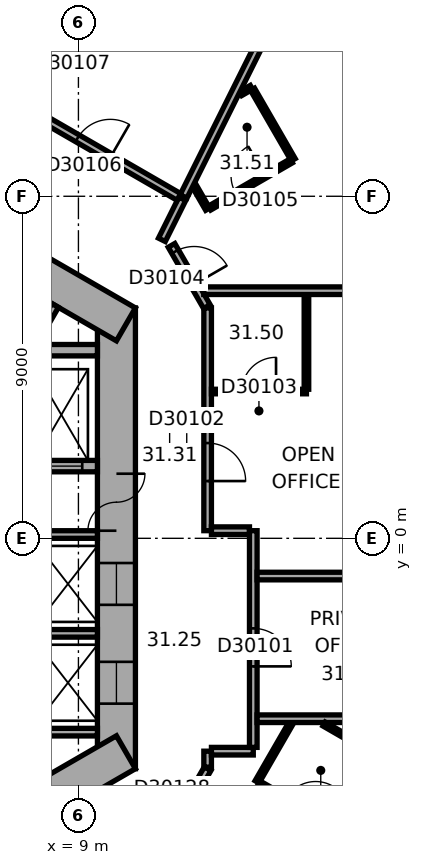
"""IFC4 building model, lengths in metres.
Left out: names, types, materials, properties, quantities, classifications, styles, units other than length and angle.
Written with IfcOpenShell. Run it as: python <this file> out.ifc"""

import sys

from ifc_helpers import new_model, si_unit, direction, frame, frame_2d, origin, place, context, subcontext, project, spatial, rectangle, extrude, element, fill, save


model = new_model("IFC4")
c1 = context("Model", 3, precision=1e-05, world=origin(), true_north=direction((0.0, 1.0)))
c2 = subcontext(c1, "Body", "Model", "MODEL_VIEW")
j1 = project(units=[si_unit("LENGTHUNIT", "METRE"), si_unit("PLANEANGLEUNIT", "RADIAN")], contexts=[c1])
p1 = place(None, origin())
s1 = spatial("IfcSite", under=j1, at=p1, CompositionType="ELEMENT")
p2 = place(p1, origin())
s2 = spatial("IfcBuilding", under=s1, at=p2, CompositionType="ELEMENT")
p3 = place(p2, frame((0.0, 0.0, 128.1)))
s3 = spatial("IfcBuildingStorey", under=s2, at=p3, CompositionType="ELEMENT", Elevation=128.1)
p4 = place(p3, frame((10.0, -6.062, 0.0), z_axis=(0.0, 0.0, 1.0), x_axis=(0.0, 1.0, 0.0)))
e1 = element("IfcWall", 1, at=p4, inside=s3, PredefinedType="SHEAR", context=c2, shape_type="SweptSolid", body=[
    extrude(rectangle(XDim=12.125, YDim=1.0, at=frame_2d((6.062, 0.0))), origin(), (0.0, 0.0, 1.0), 3.7),
])
p5 = place(p4, frame((6.262, 0.0, 0.0)))
e2 = element("IfcOpeningElement", 2, at=p5, cuts=e1, PredefinedType="OPENING", context=c2, shape_type="SweptSolid", body=[
    extrude(rectangle(XDim=1.5, YDim=2.1, at=frame_2d((0.75, 1.05))), frame((0.0, 0.51, 0.0), z_axis=(0.0, -1.0, 0.0), x_axis=(1.0, 0.0, 0.0)), (0.0, 0.0, 1.0), 1.02),
])
p6 = place(p4, frame((1.712, 0.0, 0.0)))
e3 = element("IfcOpeningElement", 3, at=p6, cuts=e1, PredefinedType="OPENING", context=c2, shape_type="SweptSolid", body=[
    extrude(rectangle(XDim=1.1, YDim=2.1, at=frame_2d((0.55, 1.05))), frame((0.0, 0.51, 0.0), z_axis=(0.0, -1.0, 0.0), x_axis=(1.0, 0.0, 0.0)), (0.0, 0.0, 1.0), 1.02),
])
p7 = place(p4, frame((4.312, 0.0, 0.0)))
e4 = element("IfcOpeningElement", 4, at=p7, cuts=e1, PredefinedType="OPENING", context=c2, shape_type="SweptSolid", body=[
    extrude(rectangle(XDim=1.1, YDim=2.1, at=frame_2d((0.55, 1.05))), frame((0.0, 0.51, 0.0), z_axis=(0.0, -1.0, 0.0), x_axis=(1.0, 0.0, 0.0)), (0.0, 0.0, 1.0), 1.02),
])
p8 = place(p3, frame((10.25, 5.629, 0.0), z_axis=(0.0, 0.0, 1.0), x_axis=(-0.866022616891, 0.50000482701, 0.0)))
e5 = element("IfcWall", 5, at=p8, inside=s3, PredefinedType="SHEAR", context=c2, shape_type="SweptSolid", body=[
    extrude(rectangle(XDim=12.125, YDim=1.0, at=frame_2d((6.062, 0.0))), origin(), (0.0, 0.0, 1.0), 3.7),
])
p9 = place(p8, frame((2.612, 0.0, 0.0)))
e6 = element("IfcOpeningElement", 6, at=p9, cuts=e5, PredefinedType="OPENING", context=c2, shape_type="SweptSolid", body=[
    extrude(rectangle(XDim=1.1, YDim=2.1, at=frame_2d((0.55, 1.05))), frame((0.0, 0.51, 0.0), z_axis=(0.0, -1.0, 0.0), x_axis=(1.0, 0.0, 0.0)), (0.0, 0.0, 1.0), 1.02),
])
p10 = place(p8, frame((5.212, 0.0, 0.0)))
e7 = element("IfcOpeningElement", 7, at=p10, cuts=e5, PredefinedType="OPENING", context=c2, shape_type="SweptSolid", body=[
    extrude(rectangle(XDim=1.1, YDim=2.1, at=frame_2d((0.55, 1.05))), frame((0.0, 0.51, 0.0), z_axis=(0.0, -1.0, 0.0), x_axis=(1.0, 0.0, 0.0)), (0.0, 0.0, 1.0), 1.02),
])
p11 = place(p8, frame((7.812, 0.0, 0.0)))
e8 = element("IfcOpeningElement", 8, at=p11, cuts=e5, PredefinedType="OPENING", context=c2, shape_type="SweptSolid", body=[
    extrude(rectangle(XDim=1.1, YDim=2.1, at=frame_2d((0.55, 1.05))), frame((0.0, 0.51, 0.0), z_axis=(0.0, -1.0, 0.0), x_axis=(1.0, 0.0, 0.0)), (0.0, 0.0, 1.0), 1.02),
])
p12 = place(p3, frame((-0.25, -11.691, 0.0), z_axis=(0.0, 0.0, 1.0), x_axis=(0.866022616891, 0.50000482701, 0.0)))
e9 = element("IfcWall", 9, at=p12, inside=s3, PredefinedType="SHEAR", context=c2, shape_type="SweptSolid", body=[
    extrude(rectangle(XDim=12.125, YDim=1.0, at=frame_2d((6.062, 0.0))), origin(), (0.0, 0.0, 1.0), 3.7),
])
p13 = place(p12, frame((4.012, 0.0, 0.0)))
e10 = element("IfcOpeningElement", 10, at=p13, cuts=e9, PredefinedType="OPENING", context=c2, shape_type="SweptSolid", body=[
    extrude(rectangle(XDim=0.9, YDim=2.1, at=frame_2d((0.45, 1.05))), frame((0.0, 0.51, 0.0), z_axis=(0.0, -1.0, 0.0), x_axis=(1.0, 0.0, 0.0)), (0.0, 0.0, 1.0), 1.02),
])
p14 = place(p12, frame((7.812, 0.0, 0.0)))
e11 = element("IfcOpeningElement", 11, at=p14, cuts=e9, PredefinedType="OPENING", context=c2, shape_type="SweptSolid", body=[
    extrude(rectangle(XDim=1.1, YDim=2.1, at=frame_2d((0.55, 1.05))), frame((0.0, 0.51, 0.0), z_axis=(0.0, -1.0, 0.0), x_axis=(1.0, 0.0, 0.0)), (0.0, 0.0, 1.0), 1.02),
])
for number, where, z_axis, x_axis in (
    (12, (7.3, -5.1, 0.0), (0.0, 0.0, 1.0), (1.0, 0.0, 0.0)),
    (13, (7.3, -2.5, 0.0), (0.0, 0.0, 1.0), (1.0, 0.0, 0.0)),
    (14, (7.3, 0.1, 0.0), (0.0, 0.0, 1.0), (1.0, 0.0, 0.0)),
    (15, (7.287, 4.222, 0.0), (0.0, 0.0, 1.0), (0.5, 0.866, 0.0)),
):
    element("IfcWall", number, at=place(p3, frame(where, z_axis=z_axis, x_axis=x_axis)), inside=s3, PredefinedType="PARTITIONING", context=c2, shape_type="SweptSolid", body=[
        extrude(rectangle(XDim=2.2, YDim=0.2, at=frame_2d((1.1, 0.0))), origin(), (0.0, 0.0, 1.0), 3.42),
    ])
p15 = place(p3, frame((7.3, 1.9, 0.0), z_axis=(0.0, 0.0, 1.0), x_axis=(1.0, 0.0, 0.0)))
e16 = element("IfcWall", 16, at=p15, inside=s3, PredefinedType="SHEAR", context=c2, shape_type="SweptSolid", body=[
    extrude(rectangle(XDim=2.2, YDim=0.3, at=frame_2d((1.1, 0.0))), origin(), (0.0, 0.0, 1.0), 3.42),
])
p16 = place(p15, frame((0.7, 0.0, 0.0)))
e17 = element("IfcOpeningElement", 17, at=p16, cuts=e16, PredefinedType="OPENING", context=c2, shape_type="SweptSolid", body=[
    extrude(rectangle(XDim=1.1, YDim=2.1, at=frame_2d((0.55, 1.05))), frame((0.0, 0.16, 0.0), z_axis=(0.0, -1.0, 0.0), x_axis=(1.0, 0.0, 0.0)), (0.0, 0.0, 1.0), 0.32),
])
p17 = place(p3, frame((7.3, 4.95, 0.0), z_axis=(0.0, 0.0, 1.0), x_axis=(1.0, 0.0, 0.0)))
e18 = element("IfcWall", 18, at=p17, inside=s3, PredefinedType="SHEAR", context=c2, shape_type="SweptSolid", body=[
    extrude(rectangle(XDim=2.2, YDim=0.3, at=frame_2d((1.1, 0.0))), origin(), (0.0, 0.0, 1.0), 3.42),
])
p18 = place(p3, frame((8.37, 19.013, 0.0), z_axis=(0.0, 0.0, 1.0), x_axis=(-0.446187985757, -0.894939261272, 0.0)))
e19 = element("IfcWall", 19, at=p18, inside=s3, PredefinedType="PARTITIONING", context=c2, shape_type="SweptSolid", body=[
    extrude(rectangle(XDim=6.953, YDim=0.2, at=frame_2d((3.477, 0.0))), origin(), (0.0, 0.0, 1.0), 3.42),
])
p19 = place(p3, frame((8.394, 13.792, 0.0), z_axis=(0.0, 0.0, 1.0), x_axis=(-0.500002508028, -0.866023955769, 0.0)))
e20 = element("IfcWall", 20, at=p19, inside=s3, PredefinedType="PARTITIONING", context=c2, shape_type="SweptSolid", body=[
    extrude(rectangle(XDim=2.44, YDim=0.12, at=frame_2d((1.22, 0.0))), origin(), (0.0, 0.0, 1.0), 3.42),
])
p20 = place(p19, frame((0.77, 0.0, 0.0)))
e21 = element("IfcOpeningElement", 21, at=p20, cuts=e20, PredefinedType="OPENING", context=c2, shape_type="SweptSolid", body=[
    extrude(rectangle(XDim=0.9, YDim=2.1, at=frame_2d((0.45, 1.05))), frame((0.0, 0.07, 0.0), z_axis=(0.0, -1.0, 0.0), x_axis=(1.0, 0.0, 0.0)), (0.0, 0.0, 1.0), 0.14),
])
p21 = place(p3, frame((11.196, 7.854, 0.0), z_axis=(0.0, 0.0, 1.0), x_axis=(0.446241040303, 0.894912808015, 0.0)))
e22 = element("IfcWall", 22, at=p21, inside=s3, PredefinedType="PARTITIONING", context=c2, shape_type="SweptSolid", body=[
    extrude(rectangle(XDim=1.205, YDim=0.2, at=frame_2d((0.603, 0.0))), origin(), (0.0, 0.0, 1.0), 3.42),
])
p22 = place(p3, frame((11.47, -7.673, 0.0), z_axis=(0.0, 0.0, 1.0), x_axis=(0.499964847546, 0.866045698112, 0.0)))
e23 = element("IfcWall", 23, at=p22, inside=s3, PredefinedType="PARTITIONING", context=c2, shape_type="SweptSolid", body=[
    extrude(rectangle(XDim=1.86, YDim=0.2, at=frame_2d((0.93, 0.0))), origin(), (0.0, 0.0, 1.0), 3.42),
])
p23 = place(p22, frame((0.43, 0.0, 0.0)))
e24 = element("IfcOpeningElement", 24, at=p23, cuts=e23, PredefinedType="OPENING", context=c2, shape_type="SweptSolid", body=[
    extrude(rectangle(XDim=1.0, YDim=2.1, at=frame_2d((0.5, 1.05))), frame((0.0, 0.11, 0.0), z_axis=(0.0, -1.0, 0.0), x_axis=(1.0, 0.0, 0.0)), (0.0, 0.0, 1.0), 0.22),
])
p24 = place(p3, frame((11.646, 8.981, 0.0), z_axis=(0.0, 0.0, 1.0), x_axis=(-0.866027142779, 0.499996987961, 0.0)))
e25 = element("IfcWall", 25, at=p24, inside=s3, PredefinedType="PARTITIONING", context=c2, shape_type="SweptSolid", body=[
    extrude(rectangle(XDim=9.597, YDim=0.2, at=frame_2d((4.798, 0.0))), origin(), (0.0, 0.0, 1.0), 3.42),
])
p25 = place(p24, frame((2.086, 0.0, 0.0)))
e26 = element("IfcOpeningElement", 26, at=p25, cuts=e25, PredefinedType="OPENING", context=c2, shape_type="SweptSolid", body=[
    extrude(rectangle(XDim=1.0, YDim=2.1, at=frame_2d((0.5, 1.05))), frame((0.0, 0.11, 0.0), z_axis=(0.0, -1.0, 0.0), x_axis=(1.0, 0.0, 0.0)), (0.0, 0.0, 1.0), 0.22),
])
p26 = place(p24, frame((8.01, 0.0, 0.0)))
e27 = element("IfcOpeningElement", 27, at=p26, cuts=e25, PredefinedType="OPENING", context=c2, shape_type="SweptSolid", body=[
    extrude(rectangle(XDim=1.0, YDim=2.1, at=frame_2d((0.5, 1.05))), frame((0.0, 0.11, 0.0), z_axis=(0.0, -1.0, 0.0), x_axis=(1.0, 0.0, 0.0)), (0.0, 0.0, 1.0), 0.22),
])
p27 = place(p3, frame((12.38, 6.097, 0.0), z_axis=(0.0, 0.0, 1.0), x_axis=(-0.499964847546, 0.866045698112, 0.0)))
e28 = element("IfcWall", 28, at=p27, inside=s3, PredefinedType="PARTITIONING", context=c2, shape_type="SweptSolid", body=[
    extrude(rectangle(XDim=1.86, YDim=0.2, at=frame_2d((0.93, 0.0))), origin(), (0.0, 0.0, 1.0), 3.42),
])
p28 = place(p27, frame((0.672, 0.0, 0.0)))
e29 = element("IfcOpeningElement", 29, at=p28, cuts=e28, PredefinedType="OPENING", context=c2, shape_type="SweptSolid", body=[
    extrude(rectangle(XDim=1.0, YDim=2.1, at=frame_2d((0.5, 1.05))), frame((0.0, 0.11, 0.0), z_axis=(0.0, -1.0, 0.0), x_axis=(1.0, 0.0, 0.0)), (0.0, 0.0, 1.0), 0.22),
])
p29 = place(p3, frame((12.4, -6.022, 0.0), z_axis=(0.0, 0.0, 1.0), x_axis=(0.0, 1.0, 0.0)))
e30 = element("IfcWall", 30, at=p29, inside=s3, PredefinedType="PARTITIONING", context=c2, shape_type="SweptSolid", body=[
    extrude(rectangle(XDim=0.421, YDim=0.2, at=frame_2d((0.21, 0.0))), origin(), (0.0, 0.0, 1.0), 3.42),
])
p30 = place(p3, frame((12.4, 0.201, 0.0), z_axis=(0.0, 0.0, 1.0), x_axis=(0.0, 1.0, 0.0)))
e31 = element("IfcWall", 31, at=p30, inside=s3, PredefinedType="PARTITIONING", context=c2, shape_type="SweptSolid", body=[
    extrude(rectangle(XDim=5.861, YDim=0.2, at=frame_2d((2.931, 0.0))), origin(), (0.0, 0.0, 1.0), 3.42),
])
p31 = place(p30, frame((1.306, 0.0, 0.0)))
e32 = element("IfcOpeningElement", 32, at=p31, cuts=e31, PredefinedType="OPENING", context=c2, shape_type="SweptSolid", body=[
    extrude(rectangle(XDim=1.0, YDim=2.1, at=frame_2d((0.5, 1.05))), frame((0.0, 0.11, 0.0), z_axis=(0.0, -1.0, 0.0), x_axis=(1.0, 0.0, 0.0)), (0.0, 0.0, 1.0), 0.22),
])
p32 = place(p3, frame((12.401, 8.661, 0.0), z_axis=(0.0, 0.0, 1.0), x_axis=(-0.499831418649, 0.866122712398, 0.0)))
e33 = element("IfcWall", 33, at=p32, inside=s3, PredefinedType="PARTITIONING", context=c2, shape_type="SweptSolid", body=[
    extrude(rectangle(XDim=0.711, YDim=0.12, at=frame_2d((0.355, 0.0))), origin(), (0.0, 0.0, 1.0), 3.42),
])
p33 = place(p3, frame((12.5, -5.601, 0.0), z_axis=(0.0, 0.0, 1.0), x_axis=(1.0, 0.0, 0.0)))
e34 = element("IfcWall", 34, at=p33, inside=s3, PredefinedType="PARTITIONING", context=c2, shape_type="SweptSolid", body=[
    extrude(rectangle(XDim=1.101, YDim=0.2, at=frame_2d((0.551, 0.0))), origin(), (0.0, 0.0, 1.0), 3.42),
])
p34 = place(p3, frame((13.269, 11.702, 0.0), z_axis=(0.0, 0.0, 1.0), x_axis=(0.865936922628, 0.500153222552, 0.0)))
e35 = element("IfcWall", 35, at=p34, inside=s3, PredefinedType="PARTITIONING", context=c2, shape_type="SweptSolid", body=[
    extrude(rectangle(XDim=0.327, YDim=0.12, at=frame_2d((0.164, 0.0))), origin(), (0.0, 0.0, 1.0), 3.42),
])
p35 = place(p3, frame((13.501, 0.201, 0.0), z_axis=(0.0, 0.0, 1.0), x_axis=(-1.0, 0.0, 0.0)))
e36 = element("IfcWall", 36, at=p35, inside=s3, PredefinedType="PARTITIONING", context=c2, shape_type="SweptSolid", body=[
    extrude(rectangle(XDim=1.001, YDim=0.2, at=frame_2d((0.5, 0.0))), origin(), (0.0, 0.0, 1.0), 3.42),
])
p36 = place(p3, frame((13.583, 11.814, 0.0), z_axis=(0.0, 0.0, 1.0), x_axis=(0.500028586798, -0.86600889856, 0.0)))
e37 = element("IfcWall", 37, at=p36, inside=s3, PredefinedType="PARTITIONING", context=c2, shape_type="SweptSolid", body=[
    extrude(rectangle(XDim=2.14, YDim=0.12, at=frame_2d((1.07, 0.0))), origin(), (0.0, 0.0, 1.0), 3.42),
])
p37 = place(p3, frame((13.601, -5.501, 0.0), z_axis=(0.0, 0.0, 1.0), x_axis=(0.0, 1.0, 0.0)))
e38 = element("IfcWall", 38, at=p37, inside=s3, PredefinedType="PARTITIONING", context=c2, shape_type="SweptSolid", body=[
    extrude(rectangle(XDim=5.702, YDim=0.2, at=frame_2d((2.851, 0.0))), origin(), (0.0, 0.0, 1.0), 3.42),
])
p38 = place(p37, frame((2.131, 0.0, 0.0)))
e39 = element("IfcOpeningElement", 39, at=p38, cuts=e38, PredefinedType="OPENING", context=c2, shape_type="SweptSolid", body=[
    extrude(rectangle(XDim=1.0, YDim=2.1, at=frame_2d((0.5, 1.05))), frame((0.0, 0.11, 0.0), z_axis=(0.0, -1.0, 0.0), x_axis=(1.0, 0.0, 0.0)), (0.0, 0.0, 1.0), 0.22),
])
p39 = place(p3, frame((13.701, -6.409, 0.0), z_axis=(0.0, 0.0, 1.0), x_axis=(0.500078724409, 0.865979947454, 0.0)))
e40 = element("IfcWall", 40, at=p39, inside=s3, PredefinedType="PARTITIONING", context=c2, shape_type="SweptSolid", body=[
    extrude(rectangle(XDim=1.78, YDim=0.12, at=frame_2d((0.89, 0.0))), origin(), (0.0, 0.0, 1.0), 3.42),
])
p40 = place(p3, frame((13.701, -4.747, 0.0), z_axis=(0.0, 0.0, 1.0), x_axis=(1.0, 0.0, 0.0)))
e41 = element("IfcWall", 41, at=p40, inside=s3, PredefinedType="PARTITIONING", context=c2, shape_type="SweptSolid", body=[
    extrude(rectangle(XDim=7.049, YDim=0.2, at=frame_2d((3.524, 0.0))), origin(), (0.0, 0.0, 1.0), 3.42),
])
p41 = place(p3, frame((14.601, 9.931, 0.0), z_axis=(0.0, 0.0, 1.0), x_axis=(-0.866023285932, -0.50000366821, 0.0)))
e42 = element("IfcWall", 42, at=p41, inside=s3, PredefinedType="PARTITIONING", context=c2, shape_type="SweptSolid", body=[
    extrude(rectangle(XDim=2.48, YDim=0.12, at=frame_2d((1.24, 0.0))), origin(), (0.0, 0.0, 1.0), 3.42),
])
p42 = place(p41, frame((0.79, 0.0, 0.0)))
e43 = element("IfcOpeningElement", 43, at=p42, cuts=e42, PredefinedType="OPENING", context=c2, shape_type="SweptSolid", body=[
    extrude(rectangle(XDim=0.9, YDim=2.1, at=frame_2d((0.45, 1.05))), frame((0.0, 0.07, 0.0), z_axis=(0.0, -1.0, 0.0), x_axis=(1.0, 0.0, 0.0)), (0.0, 0.0, 1.0), 0.14),
])
p43 = place(p3, frame((15.0, 3.862, 0.0), z_axis=(0.0, 0.0, 1.0), x_axis=(-1.0, 0.0, 0.0)))
e44 = element("IfcWall", 44, at=p43, inside=s3, PredefinedType="PARTITIONING", context=c2, shape_type="SweptSolid", body=[
    extrude(rectangle(XDim=2.5, YDim=0.12, at=frame_2d((1.25, 0.0))), origin(), (0.0, 0.0, 1.0), 3.42),
])
p44 = place(p43, frame((0.8, 0.0, 0.0)))
e45 = element("IfcOpeningElement", 45, at=p44, cuts=e44, PredefinedType="OPENING", context=c2, shape_type="SweptSolid", body=[
    extrude(rectangle(XDim=0.9, YDim=2.1, at=frame_2d((0.45, 1.05))), frame((0.0, 0.07, 0.0), z_axis=(0.0, -1.0, 0.0), x_axis=(1.0, 0.0, 0.0)), (0.0, 0.0, 1.0), 0.14),
])
p45 = place(p3, frame((15.0, 6.415, 0.0), z_axis=(0.0, 0.0, 1.0), x_axis=(0.0, -1.0, 0.0)))
e46 = element("IfcWall", 46, at=p45, inside=s3, PredefinedType="PARTITIONING", context=c2, shape_type="SweptSolid", body=[
    extrude(rectangle(XDim=2.493, YDim=0.12, at=frame_2d((1.247, 0.0))), origin(), (0.0, 0.0, 1.0), 3.42),
])
p46 = place(p3, frame((15.09, 15.663, 0.0), z_axis=(0.0, 0.0, 1.0), x_axis=(-0.446203977428, -0.89493128816, 0.0)))
e47 = element("IfcWall", 47, at=p46, inside=s3, PredefinedType="PARTITIONING", context=c2, shape_type="SweptSolid", body=[
    extrude(rectangle(XDim=7.45, YDim=0.2, at=frame_2d((3.725, 0.0))), origin(), (0.0, 0.0, 1.0), 3.42),
])
p47 = place(p3, frame((15.464, -4.887, 0.0), z_axis=(0.0, 0.0, 1.0), x_axis=(0.866063652425, -0.499933745558, 0.0)))
e48 = element("IfcWall", 48, at=p47, inside=s3, PredefinedType="PARTITIONING", context=c2, shape_type="SweptSolid", body=[
    extrude(rectangle(XDim=1.834, YDim=0.12, at=frame_2d((0.917, 0.0))), origin(), (0.0, 0.0, 1.0), 3.42),
])
p48 = place(p3, frame((15.952, -7.709, 0.0), z_axis=(0.0, 0.0, 1.0), x_axis=(-0.866063940332, 0.4999332468, 0.0)))
e49 = element("IfcWall", 49, at=p48, inside=s3, PredefinedType="PARTITIONING", context=c2, shape_type="SweptSolid", body=[
    extrude(rectangle(XDim=2.54, YDim=0.12, at=frame_2d((1.27, 0.0))), origin(), (0.0, 0.0, 1.0), 3.42),
])
p49 = place(p48, frame((0.82, 0.0, 0.0)))
e50 = element("IfcOpeningElement", 50, at=p49, cuts=e49, PredefinedType="OPENING", context=c2, shape_type="SweptSolid", body=[
    extrude(rectangle(XDim=0.9, YDim=2.1, at=frame_2d((0.45, 1.05))), frame((0.0, 0.07, 0.0), z_axis=(0.0, -1.0, 0.0), x_axis=(1.0, 0.0, 0.0)), (0.0, 0.0, 1.0), 0.14),
])
p50 = place(p3, frame((17.022, -5.856, 0.0), z_axis=(0.0, 0.0, 1.0), x_axis=(-0.500027264788, -0.866009661879, 0.0)))
e51 = element("IfcWall", 51, at=p50, inside=s3, PredefinedType="PARTITIONING", context=c2, shape_type="SweptSolid", body=[
    extrude(rectangle(XDim=2.08, YDim=0.12, at=frame_2d((1.04, 0.0))), origin(), (0.0, 0.0, 1.0), 3.42),
])
p51 = place(p3, frame((20.75, -0.993, 0.0), z_axis=(0.0, 0.0, 1.0), x_axis=(-1.0, 0.0, 0.0)))
e52 = element("IfcWall", 52, at=p51, inside=s3, PredefinedType="PARTITIONING", context=c2, shape_type="SweptSolid", body=[
    extrude(rectangle(XDim=7.049, YDim=0.2, at=frame_2d((3.524, 0.0))), origin(), (0.0, 0.0, 1.0), 2.87),
])
p52 = place(p3, frame((20.75, 6.515, 0.0), z_axis=(0.0, 0.0, 1.0), x_axis=(-1.0, 0.0, 0.0)))
e53 = element("IfcWall", 53, at=p52, inside=s3, PredefinedType="PARTITIONING", context=c2, shape_type="SweptSolid", body=[
    extrude(rectangle(XDim=8.452, YDim=0.2, at=frame_2d((4.226, 0.0))), origin(), (0.0, 0.0, 1.0), 3.42),
])
p53 = place(p5, origin())
e54 = element("IfcDoor", 54, at=p53, inside=s3, OperationType="DOUBLE_DOOR_SINGLE_SWING", PredefinedType="DOOR", context=c2, shape_type="SweptSolid", body=[
    extrude(rectangle(XDim=1.5, YDim=2.1, at=frame_2d((0.75, 1.05))), frame((0.0, 0.025, 0.0), z_axis=(0.0, -1.0, 0.0), x_axis=(1.0, 0.0, 0.0)), (0.0, 0.0, 1.0), 0.05),
])
fill(e2, e54)
p54 = place(p16, origin())
e55 = element("IfcDoor", 55, at=p54, inside=s3, OperationType="DOUBLE_DOOR_SLIDING", PredefinedType="DOOR", context=c2, shape_type="SweptSolid", body=[
    extrude(rectangle(XDim=1.1, YDim=2.1, at=frame_2d((0.55, 1.05))), frame((0.0, 0.025, 0.0), z_axis=(0.0, -1.0, 0.0), x_axis=(1.0, 0.0, 0.0)), (0.0, 0.0, 1.0), 0.05),
])
fill(e17, e55)
p55 = place(p6, origin())
e56 = element("IfcDoor", 56, at=p55, inside=s3, OperationType="DOUBLE_DOOR_SLIDING", PredefinedType="DOOR", context=c2, shape_type="SweptSolid", body=[
    extrude(rectangle(XDim=1.1, YDim=2.1, at=frame_2d((0.55, 1.05))), frame((0.0, 0.025, 0.0), z_axis=(0.0, -1.0, 0.0), x_axis=(1.0, 0.0, 0.0)), (0.0, 0.0, 1.0), 0.05),
])
fill(e3, e56)
p56 = place(p7, origin())
e57 = element("IfcDoor", 57, at=p56, inside=s3, OperationType="DOUBLE_DOOR_SLIDING", PredefinedType="DOOR", context=c2, shape_type="SweptSolid", body=[
    extrude(rectangle(XDim=1.1, YDim=2.1, at=frame_2d((0.55, 1.05))), frame((0.0, 0.025, 0.0), z_axis=(0.0, -1.0, 0.0), x_axis=(1.0, 0.0, 0.0)), (0.0, 0.0, 1.0), 0.05),
])
fill(e4, e57)
p57 = place(p38, origin())
e58 = element("IfcDoor", 58, at=p57, inside=s3, OperationType="SINGLE_SWING_LEFT", PredefinedType="DOOR", context=c2, shape_type="SweptSolid", body=[
    extrude(rectangle(XDim=1.0, YDim=2.1, at=frame_2d((0.5, 1.05))), frame((0.0, 0.025, 0.0), z_axis=(0.0, -1.0, 0.0), x_axis=(1.0, 0.0, 0.0)), (0.0, 0.0, 1.0), 0.05),
])
fill(e39, e58)
p58 = place(p31, origin())
e59 = element("IfcDoor", 59, at=p58, inside=s3, OperationType="SINGLE_SWING_LEFT", PredefinedType="DOOR", context=c2, shape_type="SweptSolid", body=[
    extrude(rectangle(XDim=1.0, YDim=2.1, at=frame_2d((0.5, 1.05))), frame((0.0, 0.025, 0.0), z_axis=(0.0, -1.0, 0.0), x_axis=(1.0, 0.0, 0.0)), (0.0, 0.0, 1.0), 0.05),
])
fill(e32, e59)
p59 = place(p44, origin())
e60 = element("IfcDoor", 60, at=p59, inside=s3, OperationType="SINGLE_SWING_LEFT", PredefinedType="DOOR", context=c2, shape_type="SweptSolid", body=[
    extrude(rectangle(XDim=0.9, YDim=2.1, at=frame_2d((0.45, 1.05))), frame((0.0, 0.025, 0.0), z_axis=(0.0, -1.0, 0.0), x_axis=(1.0, 0.0, 0.0)), (0.0, 0.0, 1.0), 0.05),
])
fill(e45, e60)
p60 = place(p28, origin())
e61 = element("IfcDoor", 61, at=p60, inside=s3, OperationType="SINGLE_SWING_LEFT", PredefinedType="DOOR", context=c2, shape_type="SweptSolid", body=[
    extrude(rectangle(XDim=1.0, YDim=2.1, at=frame_2d((0.5, 1.05))), frame((0.0, 0.025, 0.0), z_axis=(0.0, -1.0, 0.0), x_axis=(1.0, 0.0, 0.0)), (0.0, 0.0, 1.0), 0.05),
])
fill(e29, e61)
p61 = place(p42, origin())
e62 = element("IfcDoor", 62, at=p61, inside=s3, OperationType="SINGLE_SWING_LEFT", PredefinedType="DOOR", context=c2, shape_type="SweptSolid", body=[
    extrude(rectangle(XDim=0.9, YDim=2.1, at=frame_2d((0.45, 1.05))), frame((0.0, 0.025, 0.0), z_axis=(0.0, -1.0, 0.0), x_axis=(1.0, 0.0, 0.0)), (0.0, 0.0, 1.0), 0.05),
])
fill(e43, e62)
p62 = place(p25, origin())
e63 = element("IfcDoor", 63, at=p62, inside=s3, OperationType="SINGLE_SWING_LEFT", PredefinedType="DOOR", context=c2, shape_type="SweptSolid", body=[
    extrude(rectangle(XDim=1.0, YDim=2.1, at=frame_2d((0.5, 1.05))), frame((0.0, 0.025, 0.0), z_axis=(0.0, -1.0, 0.0), x_axis=(1.0, 0.0, 0.0)), (0.0, 0.0, 1.0), 0.05),
])
fill(e26, e63)
p63 = place(p23, origin())
e64 = element("IfcDoor", 64, at=p63, inside=s3, OperationType="SINGLE_SWING_LEFT", PredefinedType="DOOR", context=c2, shape_type="SweptSolid", body=[
    extrude(rectangle(XDim=1.0, YDim=2.1, at=frame_2d((0.5, 1.05))), frame((0.0, 0.025, 0.0), z_axis=(0.0, -1.0, 0.0), x_axis=(1.0, 0.0, 0.0)), (0.0, 0.0, 1.0), 0.05),
])
fill(e24, e64)
save(model, sys.argv[1])
